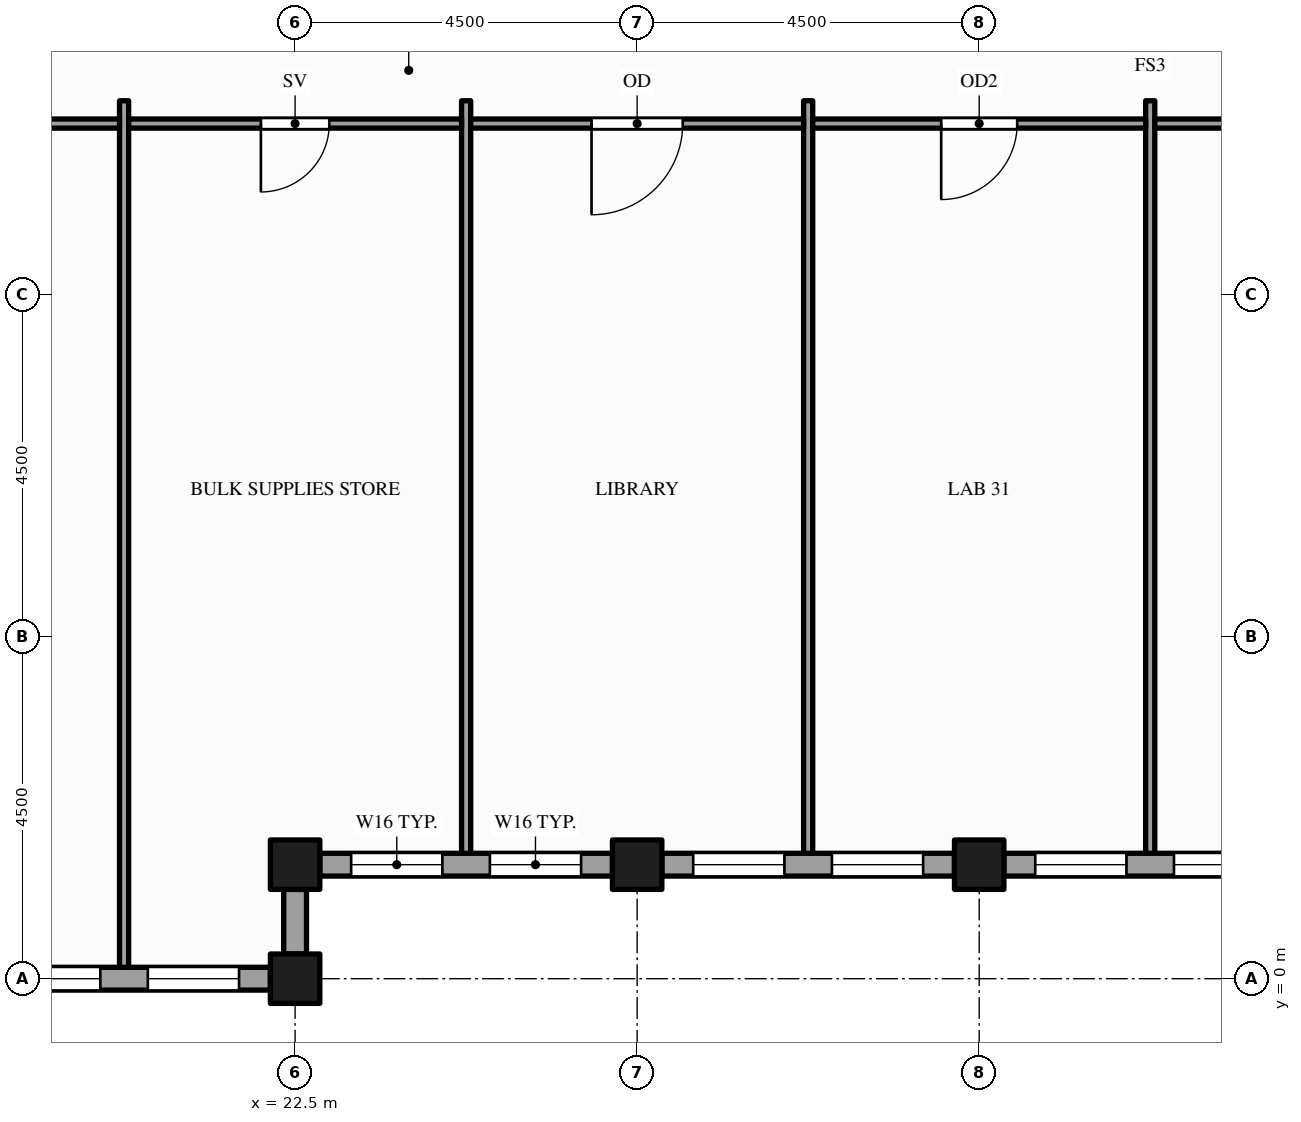
"""IFC4 building model, lengths in metres.
Left out: names, types, materials, properties, quantities, classifications, styles, units other than length and angle.
Written with IfcOpenShell. Run it as: python <this file> out.ifc"""

import sys

from ifc_helpers import new_model, si_unit, direction, frame, frame_2d, origin, origin_2d, place, context, subcontext, project, spatial, rectangle, hollow_rectangle, extrude, element, fill, save


model = new_model("IFC4")
c1 = context("Model", 3, precision=1e-05, world=origin(), true_north=direction((0.0, 1.0)))
c2 = subcontext(c1, "Body", "Model", "MODEL_VIEW")
j1 = project(units=[si_unit("LENGTHUNIT", "METRE"), si_unit("PLANEANGLEUNIT", "RADIAN")], contexts=[c1])
p1 = place(None, origin())
s1 = spatial("IfcSite", under=j1, at=p1, CompositionType="ELEMENT")
p2 = place(p1, origin())
s2 = spatial("IfcBuilding", under=s1, at=p2, CompositionType="ELEMENT")
p3 = place(p2, frame((0.0, 0.0, 261.0)))
s3 = spatial("IfcBuildingStorey", under=s2, at=p3, CompositionType="ELEMENT", Elevation=261.0)
for number, where, z_axis, x_axis in (
    (1, (22.5, 0.0, -0.15), (0.0, 0.0, 1.0), (1.0, 0.0, 0.0)),
    (2, (22.5, 1.5, -0.15), (0.0, 0.0, 1.0), (1.0, 0.0, 0.0)),
    (3, (27.0, 1.5, -0.15), (0.0, 0.0, 1.0), (1.0, 0.0, 0.0)),
    (4, (31.5, 1.5, -0.15), (0.0, 0.0, 1.0), (1.0, 0.0, 0.0)),
):
    element("IfcColumn", number, at=place(p3, frame(where, z_axis=z_axis, x_axis=x_axis)), inside=s3, PredefinedType="COLUMN", context=c2, shape_type="SweptSolid", body=[
        extrude(hollow_rectangle(XDim=0.65, YDim=0.65, WallThickness=0.032, at=origin_2d()), origin(), (0.0, 0.0, 1.0), 4.0),
    ])
p4 = place(p3, frame((22.5, 0.325, 0.0), z_axis=(0.0, 0.0, 1.0), x_axis=(0.0, 1.0, 0.0)))
e5 = element("IfcWall", 5, at=p4, inside=s3, PredefinedType="STANDARD", context=c2, shape_type="SweptSolid", body=[
    extrude(rectangle(XDim=0.85, YDim=0.3, at=frame_2d((0.425, 0.0))), origin(), (0.0, 0.0, 1.0), 3.162),
])
p5 = place(p3, frame((22.825, 1.5, 0.0), z_axis=(0.0, 0.0, 1.0), x_axis=(1.0, 0.0, 0.0)))
e6 = element("IfcWall", 6, at=p5, inside=s3, PredefinedType="STANDARD", context=c2, shape_type="SweptSolid", body=[
    extrude(rectangle(XDim=3.85, YDim=0.3, at=frame_2d((1.925, 0.0))), origin(), (0.0, 0.0, 1.0), 2.87),
])
p6 = place(p5, frame((0.413, 0.0, 0.9)))
e7 = element("IfcOpeningElement", 7, at=p6, cuts=e6, PredefinedType="OPENING", context=c2, shape_type="SweptSolid", body=[
    extrude(rectangle(XDim=1.2, YDim=1.75, at=frame_2d((0.6, 0.875))), frame((0.0, 0.16, 0.0), z_axis=(0.0, -1.0, 0.0), x_axis=(1.0, 0.0, 0.0)), (0.0, 0.0, 1.0), 0.32),
])
p7 = place(p5, frame((2.238, 0.0, 0.9)))
e8 = element("IfcOpeningElement", 8, at=p7, cuts=e6, PredefinedType="OPENING", context=c2, shape_type="SweptSolid", body=[
    extrude(rectangle(XDim=1.2, YDim=1.75, at=frame_2d((0.6, 0.875))), frame((0.0, 0.16, 0.0), z_axis=(0.0, -1.0, 0.0), x_axis=(1.0, 0.0, 0.0)), (0.0, 0.0, 1.0), 0.32),
])
p8 = place(p3, frame((27.325, 1.5, 0.0), z_axis=(0.0, 0.0, 1.0), x_axis=(1.0, 0.0, 0.0)))
e9 = element("IfcWall", 9, at=p8, inside=s3, PredefinedType="STANDARD", context=c2, shape_type="SweptSolid", body=[
    extrude(rectangle(XDim=3.85, YDim=0.3, at=frame_2d((1.925, 0.0))), origin(), (0.0, 0.0, 1.0), 2.87),
])
p9 = place(p8, frame((0.413, 0.0, 0.9)))
e10 = element("IfcOpeningElement", 10, at=p9, cuts=e9, PredefinedType="OPENING", context=c2, shape_type="SweptSolid", body=[
    extrude(rectangle(XDim=1.2, YDim=1.75, at=frame_2d((0.6, 0.875))), frame((0.0, 0.16, 0.0), z_axis=(0.0, -1.0, 0.0), x_axis=(1.0, 0.0, 0.0)), (0.0, 0.0, 1.0), 0.32),
])
p10 = place(p8, frame((2.238, 0.0, 0.9)))
e11 = element("IfcOpeningElement", 11, at=p10, cuts=e9, PredefinedType="OPENING", context=c2, shape_type="SweptSolid", body=[
    extrude(rectangle(XDim=1.2, YDim=1.75, at=frame_2d((0.6, 0.875))), frame((0.0, 0.16, 0.0), z_axis=(0.0, -1.0, 0.0), x_axis=(1.0, 0.0, 0.0)), (0.0, 0.0, 1.0), 0.32),
])
p11 = place(p3, frame((31.825, 1.5, 0.0), z_axis=(0.0, 0.0, 1.0), x_axis=(1.0, 0.0, 0.0)))
e12 = element("IfcWall", 12, at=p11, inside=s3, PredefinedType="STANDARD", context=c2, shape_type="SweptSolid", body=[
    extrude(rectangle(XDim=3.85, YDim=0.3, at=frame_2d((1.925, 0.0))), origin(), (0.0, 0.0, 1.0), 2.87),
])
p12 = place(p11, frame((0.413, 0.0, 0.9)))
e13 = element("IfcOpeningElement", 13, at=p12, cuts=e12, PredefinedType="OPENING", context=c2, shape_type="SweptSolid", body=[
    extrude(rectangle(XDim=1.2, YDim=1.75, at=frame_2d((0.6, 0.875))), frame((0.0, 0.16, 0.0), z_axis=(0.0, -1.0, 0.0), x_axis=(1.0, 0.0, 0.0)), (0.0, 0.0, 1.0), 0.32),
])
p13 = place(p11, frame((2.238, 0.0, 0.9)))
e14 = element("IfcOpeningElement", 14, at=p13, cuts=e12, PredefinedType="OPENING", context=c2, shape_type="SweptSolid", body=[
    extrude(rectangle(XDim=1.2, YDim=1.75, at=frame_2d((0.6, 0.875))), frame((0.0, 0.16, 0.0), z_axis=(0.0, -1.0, 0.0), x_axis=(1.0, 0.0, 0.0)), (0.0, 0.0, 1.0), 0.32),
])
p14 = place(p3, frame((18.325, 0.0, 0.0), z_axis=(0.0, 0.0, 1.0), x_axis=(1.0, 0.0, 0.0)))
e15 = element("IfcWall", 15, at=p14, inside=s3, PredefinedType="STANDARD", context=c2, shape_type="SweptSolid", body=[
    extrude(rectangle(XDim=3.85, YDim=0.3, at=frame_2d((1.925, 0.0))), origin(), (0.0, 0.0, 1.0), 2.87),
])
p15 = place(p14, frame((0.413, 0.0, 0.9)))
e16 = element("IfcOpeningElement", 16, at=p15, cuts=e15, PredefinedType="OPENING", context=c2, shape_type="SweptSolid", body=[
    extrude(rectangle(XDim=1.2, YDim=1.75, at=frame_2d((0.6, 0.875))), frame((0.0, 0.16, 0.0), z_axis=(0.0, -1.0, 0.0), x_axis=(1.0, 0.0, 0.0)), (0.0, 0.0, 1.0), 0.32),
])
p16 = place(p14, frame((2.238, 0.0, 0.9)))
e17 = element("IfcOpeningElement", 17, at=p16, cuts=e15, PredefinedType="OPENING", context=c2, shape_type="SweptSolid", body=[
    extrude(rectangle(XDim=1.2, YDim=1.75, at=frame_2d((0.6, 0.875))), frame((0.0, 0.16, 0.0), z_axis=(0.0, -1.0, 0.0), x_axis=(1.0, 0.0, 0.0)), (0.0, 0.0, 1.0), 0.32),
])
p17 = place(p3, frame((20.25, 0.15, 0.0), z_axis=(0.0, 0.0, 1.0), x_axis=(0.0, 1.0, 0.0)))
e18 = element("IfcWall", 18, at=p17, inside=s3, PredefinedType="PARTITIONING", context=c2, shape_type="SweptSolid", body=[
    extrude(rectangle(XDim=11.4, YDim=0.12, at=frame_2d((5.7, 0.0))), origin(), (0.0, 0.0, 1.0), 2.87),
])
for number, where, z_axis, x_axis in (
    (19, (24.75, 1.65, 0.0), (0.0, 0.0, 1.0), (0.0, 1.0, 0.0)),
    (20, (29.25, 1.65, 0.0), (0.0, 0.0, 1.0), (0.0, 1.0, 0.0)),
    (21, (33.75, 1.65, 0.0), (0.0, 0.0, 1.0), (0.0, 1.0, 0.0)),
):
    element("IfcWall", number, at=place(p3, frame(where, z_axis=z_axis, x_axis=x_axis)), inside=s3, PredefinedType="PARTITIONING", context=c2, shape_type="SweptSolid", body=[
        extrude(rectangle(XDim=9.9, YDim=0.12, at=frame_2d((4.95, 0.0))), origin(), (0.0, 0.0, 1.0), 2.87),
    ])
p18 = place(p3, frame((11.31, 11.25, 0.0), z_axis=(0.0, 0.0, 1.0), x_axis=(1.0, 0.0, 0.0)))
e22 = element("IfcWall", 22, at=p18, inside=s3, PredefinedType="PARTITIONING", context=c2, shape_type="SweptSolid", body=[
    extrude(rectangle(XDim=8.88, YDim=0.12, at=frame_2d((4.44, 0.0))), origin(), (0.0, 0.0, 1.0), 2.87),
])
p19 = place(p18, frame((3.94, 0.0, 0.0)))
e23 = element("IfcOpeningElement", 23, at=p19, cuts=e22, PredefinedType="OPENING", context=c2, shape_type="SweptSolid", body=[
    extrude(rectangle(XDim=1.0, YDim=2.1, at=frame_2d((0.5, 1.05))), frame((0.0, 0.07, 0.0), z_axis=(0.0, -1.0, 0.0), x_axis=(1.0, 0.0, 0.0)), (0.0, 0.0, 1.0), 0.14),
])
p20 = place(p3, frame((20.31, 11.25, 0.0), z_axis=(0.0, 0.0, 1.0), x_axis=(1.0, 0.0, 0.0)))
e24 = element("IfcWall", 24, at=p20, inside=s3, PredefinedType="PARTITIONING", context=c2, shape_type="SweptSolid", body=[
    extrude(rectangle(XDim=4.38, YDim=0.12, at=frame_2d((2.19, 0.0))), origin(), (0.0, 0.0, 1.0), 2.87),
])
p21 = place(p20, frame((1.74, 0.0, 0.0)))
e25 = element("IfcOpeningElement", 25, at=p21, cuts=e24, PredefinedType="OPENING", context=c2, shape_type="SweptSolid", body=[
    extrude(rectangle(XDim=0.9, YDim=2.1, at=frame_2d((0.45, 1.05))), frame((0.0, 0.07, 0.0), z_axis=(0.0, -1.0, 0.0), x_axis=(1.0, 0.0, 0.0)), (0.0, 0.0, 1.0), 0.14),
])
p22 = place(p3, frame((24.81, 11.25, 0.0), z_axis=(0.0, 0.0, 1.0), x_axis=(1.0, 0.0, 0.0)))
e26 = element("IfcWall", 26, at=p22, inside=s3, PredefinedType="PARTITIONING", context=c2, shape_type="SweptSolid", body=[
    extrude(rectangle(XDim=4.38, YDim=0.12, at=frame_2d((2.19, 0.0))), origin(), (0.0, 0.0, 1.0), 2.87),
])
p23 = place(p22, frame((1.59, 0.0, 0.0)))
e27 = element("IfcOpeningElement", 27, at=p23, cuts=e26, PredefinedType="OPENING", context=c2, shape_type="SweptSolid", body=[
    extrude(rectangle(XDim=1.2, YDim=2.1, at=frame_2d((0.6, 1.05))), frame((0.0, 0.07, 0.0), z_axis=(0.0, -1.0, 0.0), x_axis=(1.0, 0.0, 0.0)), (0.0, 0.0, 1.0), 0.14),
])
p24 = place(p3, frame((29.31, 11.25, 0.0), z_axis=(0.0, 0.0, 1.0), x_axis=(1.0, 0.0, 0.0)))
e28 = element("IfcWall", 28, at=p24, inside=s3, PredefinedType="PARTITIONING", context=c2, shape_type="SweptSolid", body=[
    extrude(rectangle(XDim=4.38, YDim=0.12, at=frame_2d((2.19, 0.0))), origin(), (0.0, 0.0, 1.0), 2.87),
])
p25 = place(p24, frame((1.69, 0.0, 0.0)))
e29 = element("IfcOpeningElement", 29, at=p25, cuts=e28, PredefinedType="OPENING", context=c2, shape_type="SweptSolid", body=[
    extrude(rectangle(XDim=1.0, YDim=2.1, at=frame_2d((0.5, 1.05))), frame((0.0, 0.07, 0.0), z_axis=(0.0, -1.0, 0.0), x_axis=(1.0, 0.0, 0.0)), (0.0, 0.0, 1.0), 0.14),
])
p26 = place(p3, frame((33.81, 11.25, 0.0), z_axis=(0.0, 0.0, 1.0), x_axis=(1.0, 0.0, 0.0)))
e30 = element("IfcWall", 30, at=p26, inside=s3, PredefinedType="PARTITIONING", context=c2, shape_type="SweptSolid", body=[
    extrude(rectangle(XDim=13.38, YDim=0.12, at=frame_2d((6.69, 0.0))), origin(), (0.0, 0.0, 1.0), 2.87),
])
p27 = place(p26, frame((5.79, 0.0, 0.0)))
e31 = element("IfcOpeningElement", 31, at=p27, cuts=e30, PredefinedType="OPENING", context=c2, shape_type="SweptSolid", body=[
    extrude(rectangle(XDim=1.8, YDim=2.1, at=frame_2d((0.9, 1.05))), frame((0.0, 0.07, 0.0), z_axis=(0.0, -1.0, 0.0), x_axis=(1.0, 0.0, 0.0)), (0.0, 0.0, 1.0), 0.14),
])
p28 = place(p6, origin())
e32 = element("IfcWindow", 32, at=p28, inside=s3, PartitioningType="SINGLE_PANEL", PredefinedType="WINDOW", context=c2, shape_type="SweptSolid", body=[
    extrude(rectangle(XDim=1.2, YDim=1.75, at=frame_2d((0.6, 0.875))), frame((0.0, 0.03, 0.0), z_axis=(0.0, -1.0, 0.0), x_axis=(1.0, 0.0, 0.0)), (0.0, 0.0, 1.0), 0.06),
])
fill(e7, e32)
p29 = place(p7, origin())
e33 = element("IfcWindow", 33, at=p29, inside=s3, PartitioningType="SINGLE_PANEL", PredefinedType="WINDOW", context=c2, shape_type="SweptSolid", body=[
    extrude(rectangle(XDim=1.2, YDim=1.75, at=frame_2d((0.6, 0.875))), frame((0.0, 0.03, 0.0), z_axis=(0.0, -1.0, 0.0), x_axis=(1.0, 0.0, 0.0)), (0.0, 0.0, 1.0), 0.06),
])
fill(e8, e33)
p30 = place(p9, origin())
e34 = element("IfcWindow", 34, at=p30, inside=s3, PartitioningType="SINGLE_PANEL", PredefinedType="WINDOW", context=c2, shape_type="SweptSolid", body=[
    extrude(rectangle(XDim=1.2, YDim=1.75, at=frame_2d((0.6, 0.875))), frame((0.0, 0.03, 0.0), z_axis=(0.0, -1.0, 0.0), x_axis=(1.0, 0.0, 0.0)), (0.0, 0.0, 1.0), 0.06),
])
fill(e10, e34)
p31 = place(p10, origin())
e35 = element("IfcWindow", 35, at=p31, inside=s3, PartitioningType="SINGLE_PANEL", PredefinedType="WINDOW", context=c2, shape_type="SweptSolid", body=[
    extrude(rectangle(XDim=1.2, YDim=1.75, at=frame_2d((0.6, 0.875))), frame((0.0, 0.03, 0.0), z_axis=(0.0, -1.0, 0.0), x_axis=(1.0, 0.0, 0.0)), (0.0, 0.0, 1.0), 0.06),
])
fill(e11, e35)
p32 = place(p12, origin())
e36 = element("IfcWindow", 36, at=p32, inside=s3, PartitioningType="SINGLE_PANEL", PredefinedType="WINDOW", context=c2, shape_type="SweptSolid", body=[
    extrude(rectangle(XDim=1.2, YDim=1.75, at=frame_2d((0.6, 0.875))), frame((0.0, 0.03, 0.0), z_axis=(0.0, -1.0, 0.0), x_axis=(1.0, 0.0, 0.0)), (0.0, 0.0, 1.0), 0.06),
])
fill(e13, e36)
p33 = place(p13, origin())
e37 = element("IfcWindow", 37, at=p33, inside=s3, PartitioningType="SINGLE_PANEL", PredefinedType="WINDOW", context=c2, shape_type="SweptSolid", body=[
    extrude(rectangle(XDim=1.2, YDim=1.75, at=frame_2d((0.6, 0.875))), frame((0.0, 0.03, 0.0), z_axis=(0.0, -1.0, 0.0), x_axis=(1.0, 0.0, 0.0)), (0.0, 0.0, 1.0), 0.06),
])
fill(e14, e37)
p34 = place(p15, origin())
e38 = element("IfcWindow", 38, at=p34, inside=s3, PartitioningType="SINGLE_PANEL", PredefinedType="WINDOW", context=c2, shape_type="SweptSolid", body=[
    extrude(rectangle(XDim=1.2, YDim=1.75, at=frame_2d((0.6, 0.875))), frame((0.0, 0.03, 0.0), z_axis=(0.0, -1.0, 0.0), x_axis=(1.0, 0.0, 0.0)), (0.0, 0.0, 1.0), 0.06),
])
fill(e16, e38)
p35 = place(p16, origin())
e39 = element("IfcWindow", 39, at=p35, inside=s3, PartitioningType="SINGLE_PANEL", PredefinedType="WINDOW", context=c2, shape_type="SweptSolid", body=[
    extrude(rectangle(XDim=1.2, YDim=1.75, at=frame_2d((0.6, 0.875))), frame((0.0, 0.03, 0.0), z_axis=(0.0, -1.0, 0.0), x_axis=(1.0, 0.0, 0.0)), (0.0, 0.0, 1.0), 0.06),
])
fill(e17, e39)
p36 = place(p21, origin())
e40 = element("IfcDoor", 40, at=p36, inside=s3, OperationType="SINGLE_SWING_LEFT", PredefinedType="DOOR", context=c2, shape_type="SweptSolid", body=[
    extrude(rectangle(XDim=0.9, YDim=2.1, at=frame_2d((0.45, 1.05))), frame((0.0, 0.025, 0.0), z_axis=(0.0, -1.0, 0.0), x_axis=(1.0, 0.0, 0.0)), (0.0, 0.0, 1.0), 0.05),
])
fill(e25, e40)
p37 = place(p23, origin())
e41 = element("IfcDoor", 41, at=p37, inside=s3, OperationType="SINGLE_SWING_LEFT", PredefinedType="DOOR", context=c2, shape_type="SweptSolid", body=[
    extrude(rectangle(XDim=1.2, YDim=2.1, at=frame_2d((0.6, 1.05))), frame((0.0, 0.025, 0.0), z_axis=(0.0, -1.0, 0.0), x_axis=(1.0, 0.0, 0.0)), (0.0, 0.0, 1.0), 0.05),
])
fill(e27, e41)
p38 = place(p25, origin())
e42 = element("IfcDoor", 42, at=p38, inside=s3, OperationType="SINGLE_SWING_LEFT", PredefinedType="DOOR", context=c2, shape_type="SweptSolid", body=[
    extrude(rectangle(XDim=1.0, YDim=2.1, at=frame_2d((0.5, 1.05))), frame((0.0, 0.025, 0.0), z_axis=(0.0, -1.0, 0.0), x_axis=(1.0, 0.0, 0.0)), (0.0, 0.0, 1.0), 0.05),
])
fill(e29, e42)
save(model, sys.argv[1])
